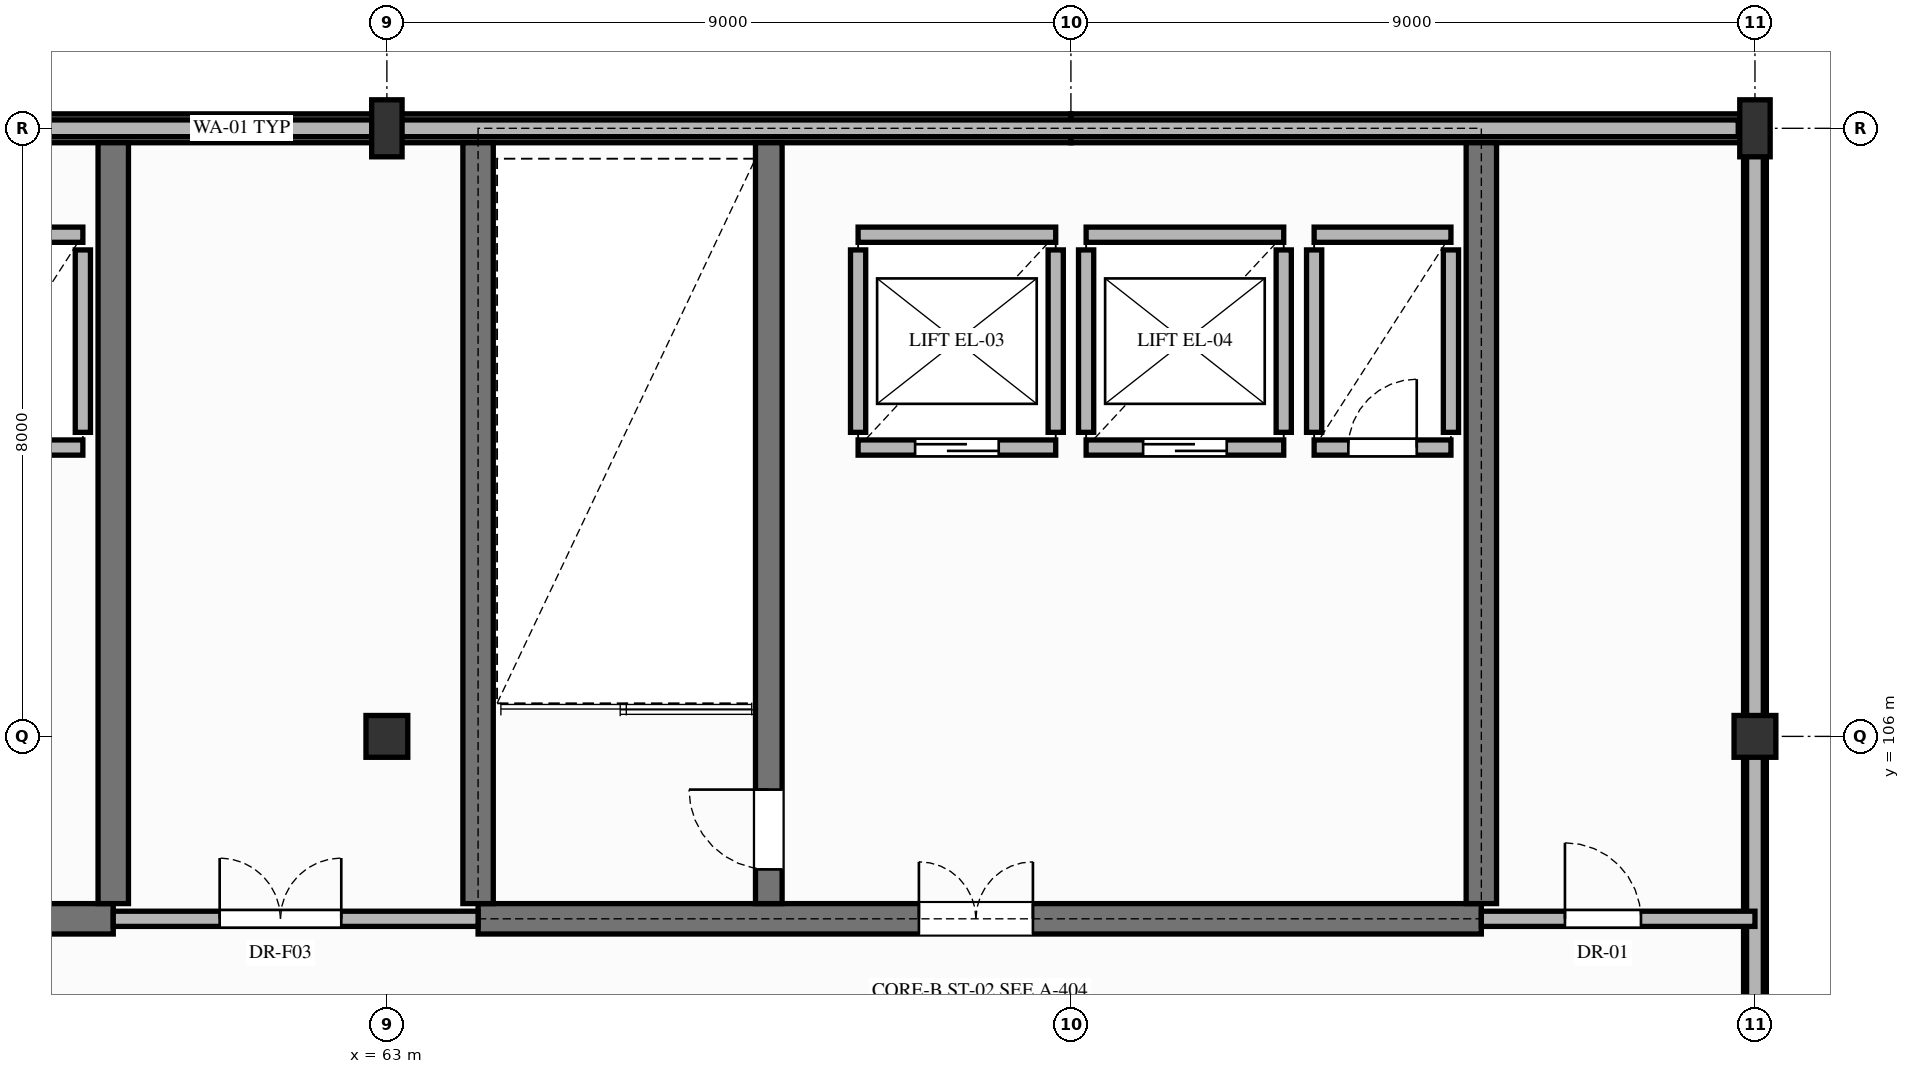
"""IFC4 building model, lengths in metres.
Left out: names, types, materials, properties, quantities, classifications, styles, units other than length and angle.
Written with IfcOpenShell. Run it as: python <this file> out.ifc"""

import sys

from ifc_helpers import new_model, si_unit, direction, frame, frame_2d, origin, origin_2d, place, context, subcontext, project, spatial, rectangle, extrude, element, fill, save


model = new_model("IFC4")
c1 = context("Model", 3, precision=1e-05, world=origin(), true_north=direction((0.0, 1.0)))
c2 = subcontext(c1, "Body", "Model", "MODEL_VIEW")
j1 = project(units=[si_unit("LENGTHUNIT", "METRE"), si_unit("PLANEANGLEUNIT", "RADIAN")], contexts=[c1])
p1 = place(None, origin())
s1 = spatial("IfcSite", under=j1, at=p1, CompositionType="ELEMENT")
p2 = place(p1, origin())
s2 = spatial("IfcBuilding", under=s1, at=p2, CompositionType="ELEMENT")
p3 = place(p2, frame((0.0, 0.0, 20.26)))
s3 = spatial("IfcBuildingStorey", under=s2, at=p3, CompositionType="ELEMENT", Elevation=20.26)
p4 = place(p3, frame((63.0, 106.0, 0.0), z_axis=(0.0, 0.0, 1.0), x_axis=(1.0, 0.0, 0.0)))
e1 = element("IfcColumn", 1, at=p4, inside=s3, PredefinedType="COLUMN", context=c2, shape_type="SweptSolid", body=[
    extrude(rectangle(XDim=0.55, YDim=0.55, at=origin_2d()), origin(), (0.0, 0.0, 1.0), 3.64),
])
p5 = place(p3, frame((63.0, 114.0, 0.0), z_axis=(0.0, 0.0, 1.0), x_axis=(0.0, 1.0, 0.0)))
e2 = element("IfcColumn", 2, at=p5, inside=s3, PredefinedType="COLUMN", context=c2, shape_type="SweptSolid", body=[
    extrude(rectangle(XDim=0.4, YDim=0.75, at=origin_2d()), origin(), (0.0, 0.0, 1.0), 3.64),
])
p6 = place(p3, frame((81.0, 106.0, 0.0), z_axis=(0.0, 0.0, 1.0), x_axis=(1.0, 0.0, 0.0)))
e3 = element("IfcColumn", 3, at=p6, inside=s3, PredefinedType="COLUMN", context=c2, shape_type="SweptSolid", body=[
    extrude(rectangle(XDim=0.55, YDim=0.55, at=origin_2d()), origin(), (0.0, 0.0, 1.0), 3.64),
])
p7 = place(p3, frame((81.0, 114.0, 0.0), z_axis=(0.0, 0.0, 1.0), x_axis=(0.0, 1.0, 0.0)))
e4 = element("IfcColumn", 4, at=p7, inside=s3, PredefinedType="COLUMN", context=c2, shape_type="SweptSolid", body=[
    extrude(rectangle(XDim=0.4, YDim=0.75, at=origin_2d()), origin(), (0.0, 0.0, 1.0), 3.64),
])
for number, where, z_axis, x_axis in (
    (5, (54.0, 114.0, 0.0), (0.0, 0.0, 1.0), (1.0, 0.0, 0.0)),
    (6, (63.0, 114.0, 0.0), (0.0, 0.0, 1.0), (1.0, 0.0, 0.0)),
    (7, (72.0, 114.0, 0.0), (0.0, 0.0, 1.0), (1.0, 0.0, 0.0)),
):
    element("IfcWall", number, at=place(p3, frame(where, z_axis=z_axis, x_axis=x_axis)), inside=s3, PredefinedType="SOLIDWALL", context=c2, shape_type="SweptSolid", body=[
        extrude(rectangle(XDim=9.0, YDim=0.38, at=frame_2d((4.5, 0.0))), origin(), (0.0, 0.0, 1.0), 3.39),
    ])
p8 = place(p3, frame((81.0, 90.0, 0.0), z_axis=(0.0, 0.0, 1.0), x_axis=(0.0, 1.0, 0.0)))
e8 = element("IfcWall", 8, at=p8, inside=s3, PredefinedType="SOLIDWALL", context=c2, shape_type="SweptSolid", body=[
    extrude(rectangle(XDim=24.0, YDim=0.3, at=frame_2d((12.0, 0.0))), origin(), (0.0, 0.0, 1.0), 2.585),
])
p9 = place(p8, frame((3.2, 0.0, 0.365)))
e9 = element("IfcOpeningElement", 9, at=p9, cuts=e8, PredefinedType="OPENING", context=c2, shape_type="SweptSolid", body=[
    extrude(rectangle(XDim=1.5, YDim=2.1, at=frame_2d((0.75, 1.05))), frame((0.0, 0.16, 0.0), z_axis=(0.0, -1.0, 0.0), x_axis=(1.0, 0.0, 0.0)), (0.0, 0.0, 1.0), 0.32),
])
p10 = place(p8, frame((10.5, 0.0, 0.615)))
e10 = element("IfcOpeningElement", 10, at=p10, cuts=e8, PredefinedType="OPENING", context=c2, shape_type="SweptSolid", body=[
    extrude(rectangle(XDim=1.35, YDim=1.85, at=frame_2d((0.675, 0.925))), frame((0.0, 0.16, 0.0), z_axis=(0.0, -1.0, 0.0), x_axis=(1.0, 0.0, 0.0)), (0.0, 0.0, 1.0), 0.32),
])
p11 = place(p3, frame((81.0, 90.22, 3.64), z_axis=(0.0, 0.0, 1.0), x_axis=(0.0, 1.0, 0.0)))
e11 = element("IfcWall", 11, at=p11, inside=s3, PredefinedType="PARAPET", context=c2, shape_type="SweptSolid", body=[
    extrude(rectangle(XDim=23.56, YDim=0.22, at=frame_2d((11.78, 0.0))), origin(), (0.0, 0.0, 1.0), 0.42),
])
p12 = place(p3, frame((80.78, 114.0, 3.64), z_axis=(0.0, 0.0, 1.0), x_axis=(-1.0, 0.0, 0.0)))
e12 = element("IfcWall", 12, at=p12, inside=s3, PredefinedType="PARAPET", context=c2, shape_type="SweptSolid", body=[
    extrude(rectangle(XDim=35.56, YDim=0.22, at=frame_2d((17.78, 0.0))), origin(), (0.0, 0.0, 1.0), 0.42),
])
p13 = place(p3, frame((46.2, 103.6, 0.0), z_axis=(0.0, 0.0, 1.0), x_axis=(1.0, 0.0, 0.0)))
e13 = element("IfcWall", 13, at=p13, inside=s3, PredefinedType="SHEAR", context=c2, shape_type="SweptSolid", body=[
    extrude(rectangle(XDim=13.2, YDim=0.4, at=frame_2d((6.6, 0.0))), origin(), (0.0, 0.0, 1.0), 3.39),
])
p14 = place(p13, frame((5.8, 0.0, 0.0)))
e14 = element("IfcOpeningElement", 14, at=p14, cuts=e13, PredefinedType="OPENING", context=c2, shape_type="SweptSolid", body=[
    extrude(rectangle(XDim=1.5, YDim=2.2, at=frame_2d((0.75, 1.1))), frame((0.0, 0.21, 0.0), z_axis=(0.0, -1.0, 0.0), x_axis=(1.0, 0.0, 0.0)), (0.0, 0.0, 1.0), 0.42),
])
p15 = place(p3, frame((59.4, 103.8, 0.0), z_axis=(0.0, 0.0, 1.0), x_axis=(0.0, 1.0, 0.0)))
e15 = element("IfcWall", 15, at=p15, inside=s3, PredefinedType="SHEAR", context=c2, shape_type="SweptSolid", body=[
    extrude(rectangle(XDim=10.01, YDim=0.4, at=frame_2d((5.005, 0.0))), origin(), (0.0, 0.0, 1.0), 3.39),
])
p16 = place(p3, frame((57.2, 109.8, 0.0), z_axis=(0.0, 0.0, 1.0), x_axis=(1.0, 0.0, 0.0)))
e16 = element("IfcWall", 16, at=p16, inside=s3, PredefinedType="PARTITIONING", context=c2, shape_type="SweptSolid", body=[
    extrude(rectangle(XDim=1.8, YDim=0.2, at=frame_2d((0.9, 0.0))), origin(), (0.0, 0.0, 1.0), 3.39),
])
p17 = place(p16, frame((0.45, 0.0, 0.0)))
e17 = element("IfcOpeningElement", 17, at=p17, cuts=e16, PredefinedType="OPENING", context=c2, shape_type="SweptSolid", body=[
    extrude(rectangle(XDim=0.9, YDim=2.1, at=frame_2d((0.45, 1.05))), frame((0.0, 0.11, 0.0), z_axis=(0.0, -1.0, 0.0), x_axis=(1.0, 0.0, 0.0)), (0.0, 0.0, 1.0), 0.22),
])
p18 = place(p3, frame((57.2, 112.6, 0.0), z_axis=(0.0, 0.0, 1.0), x_axis=(1.0, 0.0, 0.0)))
e18 = element("IfcWall", 18, at=p18, inside=s3, PredefinedType="PARTITIONING", context=c2, shape_type="SweptSolid", body=[
    extrude(rectangle(XDim=1.8, YDim=0.2, at=frame_2d((0.9, 0.0))), origin(), (0.0, 0.0, 1.0), 3.39),
])
p19 = place(p3, frame((59.0, 110.0, 0.0), z_axis=(0.0, 0.0, 1.0), x_axis=(0.0, 1.0, 0.0)))
e19 = element("IfcWall", 19, at=p19, inside=s3, PredefinedType="PARTITIONING", context=c2, shape_type="SweptSolid", body=[
    extrude(rectangle(XDim=2.4, YDim=0.2, at=frame_2d((1.2, 0.0))), origin(), (0.0, 0.0, 1.0), 3.39),
])
p20 = place(p3, frame((64.2, 103.6, 0.0), z_axis=(0.0, 0.0, 1.0), x_axis=(1.0, 0.0, 0.0)))
e20 = element("IfcWall", 20, at=p20, inside=s3, PredefinedType="SHEAR", context=c2, shape_type="SweptSolid", body=[
    extrude(rectangle(XDim=13.2, YDim=0.4, at=frame_2d((6.6, 0.0))), origin(), (0.0, 0.0, 1.0), 3.39),
])
p21 = place(p20, frame((5.8, 0.0, 0.0)))
e21 = element("IfcOpeningElement", 21, at=p21, cuts=e20, PredefinedType="OPENING", context=c2, shape_type="SweptSolid", body=[
    extrude(rectangle(XDim=1.5, YDim=2.2, at=frame_2d((0.75, 1.1))), frame((0.0, 0.21, 0.0), z_axis=(0.0, -1.0, 0.0), x_axis=(1.0, 0.0, 0.0)), (0.0, 0.0, 1.0), 0.42),
])
for number, where, z_axis, x_axis in (
    (22, (64.2, 103.8, 0.0), (0.0, 0.0, 1.0), (0.0, 1.0, 0.0)),
    (23, (77.4, 103.8, 0.0), (0.0, 0.0, 1.0), (0.0, 1.0, 0.0)),
):
    element("IfcWall", number, at=place(p3, frame(where, z_axis=z_axis, x_axis=x_axis)), inside=s3, PredefinedType="SHEAR", context=c2, shape_type="SweptSolid", body=[
        extrude(rectangle(XDim=10.01, YDim=0.4, at=frame_2d((5.005, 0.0))), origin(), (0.0, 0.0, 1.0), 3.39),
    ])
p22 = place(p3, frame((68.025, 103.8, 0.0), z_axis=(0.0, 0.0, 1.0), x_axis=(0.0, 1.0, 0.0)))
e24 = element("IfcWall", 24, at=p22, inside=s3, PredefinedType="SHEAR", context=c2, shape_type="SweptSolid", body=[
    extrude(rectangle(XDim=10.01, YDim=0.35, at=frame_2d((5.005, 0.0))), origin(), (0.0, 0.0, 1.0), 3.39),
])
p23 = place(p22, frame((0.45, 0.0, 0.0)))
e25 = element("IfcOpeningElement", 25, at=p23, cuts=e24, PredefinedType="OPENING", context=c2, shape_type="SweptSolid", body=[
    extrude(rectangle(XDim=1.05, YDim=2.2, at=frame_2d((0.525, 1.1))), frame((0.0, 0.185, 0.0), z_axis=(0.0, -1.0, 0.0), x_axis=(1.0, 0.0, 0.0)), (0.0, 0.0, 1.0), 0.37),
])
p24 = place(p3, frame((69.2, 109.8, 0.0), z_axis=(0.0, 0.0, 1.0), x_axis=(1.0, 0.0, 0.0)))
e26 = element("IfcWall", 26, at=p24, inside=s3, PredefinedType="PARTITIONING", context=c2, shape_type="SweptSolid", body=[
    extrude(rectangle(XDim=2.6, YDim=0.2, at=frame_2d((1.3, 0.0))), origin(), (0.0, 0.0, 1.0), 3.39),
])
p25 = place(p24, frame((0.75, 0.0, 0.0)))
e27 = element("IfcOpeningElement", 27, at=p25, cuts=e26, PredefinedType="OPENING", context=c2, shape_type="SweptSolid", body=[
    extrude(rectangle(XDim=1.1, YDim=2.15, at=frame_2d((0.55, 1.075))), frame((0.0, 0.11, 0.0), z_axis=(0.0, -1.0, 0.0), x_axis=(1.0, 0.0, 0.0)), (0.0, 0.0, 1.0), 0.22),
])
p26 = place(p3, frame((69.2, 112.6, 0.0), z_axis=(0.0, 0.0, 1.0), x_axis=(1.0, 0.0, 0.0)))
e28 = element("IfcWall", 28, at=p26, inside=s3, PredefinedType="PARTITIONING", context=c2, shape_type="SweptSolid", body=[
    extrude(rectangle(XDim=2.6, YDim=0.2, at=frame_2d((1.3, 0.0))), origin(), (0.0, 0.0, 1.0), 3.39),
])
for number, where, z_axis, x_axis in (
    (29, (69.2, 110.0, 0.0), (0.0, 0.0, 1.0), (0.0, 1.0, 0.0)),
    (30, (71.8, 110.0, 0.0), (0.0, 0.0, 1.0), (0.0, 1.0, 0.0)),
):
    element("IfcWall", number, at=place(p3, frame(where, z_axis=z_axis, x_axis=x_axis)), inside=s3, PredefinedType="PARTITIONING", context=c2, shape_type="SweptSolid", body=[
        extrude(rectangle(XDim=2.4, YDim=0.2, at=frame_2d((1.2, 0.0))), origin(), (0.0, 0.0, 1.0), 3.39),
    ])
p27 = place(p3, frame((72.2, 109.8, 0.0), z_axis=(0.0, 0.0, 1.0), x_axis=(1.0, 0.0, 0.0)))
e31 = element("IfcWall", 31, at=p27, inside=s3, PredefinedType="PARTITIONING", context=c2, shape_type="SweptSolid", body=[
    extrude(rectangle(XDim=2.6, YDim=0.2, at=frame_2d((1.3, 0.0))), origin(), (0.0, 0.0, 1.0), 3.39),
])
p28 = place(p27, frame((0.75, 0.0, 0.0)))
e32 = element("IfcOpeningElement", 32, at=p28, cuts=e31, PredefinedType="OPENING", context=c2, shape_type="SweptSolid", body=[
    extrude(rectangle(XDim=1.1, YDim=2.15, at=frame_2d((0.55, 1.075))), frame((0.0, 0.11, 0.0), z_axis=(0.0, -1.0, 0.0), x_axis=(1.0, 0.0, 0.0)), (0.0, 0.0, 1.0), 0.22),
])
p29 = place(p3, frame((72.2, 112.6, 0.0), z_axis=(0.0, 0.0, 1.0), x_axis=(1.0, 0.0, 0.0)))
e33 = element("IfcWall", 33, at=p29, inside=s3, PredefinedType="PARTITIONING", context=c2, shape_type="SweptSolid", body=[
    extrude(rectangle(XDim=2.6, YDim=0.2, at=frame_2d((1.3, 0.0))), origin(), (0.0, 0.0, 1.0), 3.39),
])
for number, where, z_axis, x_axis in (
    (34, (72.2, 110.0, 0.0), (0.0, 0.0, 1.0), (0.0, 1.0, 0.0)),
    (35, (74.8, 110.0, 0.0), (0.0, 0.0, 1.0), (0.0, 1.0, 0.0)),
):
    element("IfcWall", number, at=place(p3, frame(where, z_axis=z_axis, x_axis=x_axis)), inside=s3, PredefinedType="PARTITIONING", context=c2, shape_type="SweptSolid", body=[
        extrude(rectangle(XDim=2.4, YDim=0.2, at=frame_2d((1.2, 0.0))), origin(), (0.0, 0.0, 1.0), 3.39),
    ])
p30 = place(p3, frame((75.2, 109.8, 0.0), z_axis=(0.0, 0.0, 1.0), x_axis=(1.0, 0.0, 0.0)))
e36 = element("IfcWall", 36, at=p30, inside=s3, PredefinedType="PARTITIONING", context=c2, shape_type="SweptSolid", body=[
    extrude(rectangle(XDim=1.8, YDim=0.2, at=frame_2d((0.9, 0.0))), origin(), (0.0, 0.0, 1.0), 3.39),
])
p31 = place(p30, frame((0.45, 0.0, 0.0)))
e37 = element("IfcOpeningElement", 37, at=p31, cuts=e36, PredefinedType="OPENING", context=c2, shape_type="SweptSolid", body=[
    extrude(rectangle(XDim=0.9, YDim=2.1, at=frame_2d((0.45, 1.05))), frame((0.0, 0.11, 0.0), z_axis=(0.0, -1.0, 0.0), x_axis=(1.0, 0.0, 0.0)), (0.0, 0.0, 1.0), 0.22),
])
p32 = place(p3, frame((75.2, 112.6, 0.0), z_axis=(0.0, 0.0, 1.0), x_axis=(1.0, 0.0, 0.0)))
e38 = element("IfcWall", 38, at=p32, inside=s3, PredefinedType="PARTITIONING", context=c2, shape_type="SweptSolid", body=[
    extrude(rectangle(XDim=1.8, YDim=0.2, at=frame_2d((0.9, 0.0))), origin(), (0.0, 0.0, 1.0), 3.39),
])
for number, where, z_axis, x_axis in (
    (39, (75.2, 110.0, 0.0), (0.0, 0.0, 1.0), (0.0, 1.0, 0.0)),
    (40, (77.0, 110.0, 0.0), (0.0, 0.0, 1.0), (0.0, 1.0, 0.0)),
):
    element("IfcWall", number, at=place(p3, frame(where, z_axis=z_axis, x_axis=x_axis)), inside=s3, PredefinedType="PARTITIONING", context=c2, shape_type="SweptSolid", body=[
        extrude(rectangle(XDim=2.4, YDim=0.2, at=frame_2d((1.2, 0.0))), origin(), (0.0, 0.0, 1.0), 3.39),
    ])
p33 = place(p3, frame((59.4, 103.6, 0.0), z_axis=(0.0, 0.0, 1.0), x_axis=(1.0, 0.0, 0.0)))
e41 = element("IfcWall", 41, at=p33, inside=s3, PredefinedType="PARTITIONING", context=c2, shape_type="SweptSolid", body=[
    extrude(rectangle(XDim=4.8, YDim=0.2, at=frame_2d((2.4, 0.0))), origin(), (0.0, 0.0, 1.0), 3.39),
])
p34 = place(p33, frame((1.4, 0.0, 0.0)))
e42 = element("IfcOpeningElement", 42, at=p34, cuts=e41, PredefinedType="OPENING", context=c2, shape_type="SweptSolid", body=[
    extrude(rectangle(XDim=1.6, YDim=2.2, at=frame_2d((0.8, 1.1))), frame((0.0, 0.11, 0.0), z_axis=(0.0, -1.0, 0.0), x_axis=(1.0, 0.0, 0.0)), (0.0, 0.0, 1.0), 0.22),
])
p35 = place(p3, frame((77.4, 103.6, 0.0), z_axis=(0.0, 0.0, 1.0), x_axis=(1.0, 0.0, 0.0)))
e43 = element("IfcWall", 43, at=p35, inside=s3, PredefinedType="PARTITIONING", context=c2, shape_type="SweptSolid", body=[
    extrude(rectangle(XDim=3.6, YDim=0.2, at=frame_2d((1.8, 0.0))), origin(), (0.0, 0.0, 1.0), 3.39),
])
p36 = place(p35, frame((1.1, 0.0, 0.0)))
e44 = element("IfcOpeningElement", 44, at=p36, cuts=e43, PredefinedType="OPENING", context=c2, shape_type="SweptSolid", body=[
    extrude(rectangle(XDim=1.0, YDim=2.15, at=frame_2d((0.5, 1.075))), frame((0.0, 0.11, 0.0), z_axis=(0.0, -1.0, 0.0), x_axis=(1.0, 0.0, 0.0)), (0.0, 0.0, 1.0), 0.22),
])
p37 = place(p21, origin())
e45 = element("IfcDoor", 45, at=p37, inside=s3, OperationType="DOUBLE_DOOR_SINGLE_SWING", PredefinedType="DOOR", context=c2, shape_type="SweptSolid", body=[
    extrude(rectangle(XDim=1.5, YDim=2.2, at=frame_2d((0.75, 1.1))), frame((0.0, 0.025, 0.0), z_axis=(0.0, -1.0, 0.0), x_axis=(1.0, 0.0, 0.0)), (0.0, 0.0, 1.0), 0.05),
])
fill(e21, e45)
p38 = place(p23, origin())
e46 = element("IfcDoor", 46, at=p38, inside=s3, OperationType="SINGLE_SWING_RIGHT", PredefinedType="DOOR", context=c2, shape_type="SweptSolid", body=[
    extrude(rectangle(XDim=1.05, YDim=2.2, at=frame_2d((0.525, 1.1))), frame((0.0, 0.025, 0.0), z_axis=(0.0, -1.0, 0.0), x_axis=(1.0, 0.0, 0.0)), (0.0, 0.0, 1.0), 0.05),
])
fill(e25, e46)
p39 = place(p25, origin())
e47 = element("IfcDoor", 47, at=p39, inside=s3, OperationType="SLIDING_TO_LEFT", PredefinedType="DOOR", context=c2, shape_type="SweptSolid", body=[
    extrude(rectangle(XDim=1.1, YDim=2.15, at=frame_2d((0.55, 1.075))), frame((0.0, 0.025, 0.0), z_axis=(0.0, -1.0, 0.0), x_axis=(1.0, 0.0, 0.0)), (0.0, 0.0, 1.0), 0.05),
])
fill(e27, e47)
p40 = place(p28, origin())
e48 = element("IfcDoor", 48, at=p40, inside=s3, OperationType="SLIDING_TO_RIGHT", PredefinedType="DOOR", context=c2, shape_type="SweptSolid", body=[
    extrude(rectangle(XDim=1.1, YDim=2.15, at=frame_2d((0.55, 1.075))), frame((0.0, 0.025, 0.0), z_axis=(0.0, -1.0, 0.0), x_axis=(1.0, 0.0, 0.0)), (0.0, 0.0, 1.0), 0.05),
])
fill(e32, e48)
p41 = place(p31, origin())
e49 = element("IfcDoor", 49, at=p41, inside=s3, OperationType="SINGLE_SWING_RIGHT", PredefinedType="DOOR", context=c2, shape_type="SweptSolid", body=[
    extrude(rectangle(XDim=0.9, YDim=2.1, at=frame_2d((0.45, 1.05))), frame((0.0, 0.025, 0.0), z_axis=(0.0, -1.0, 0.0), x_axis=(1.0, 0.0, 0.0)), (0.0, 0.0, 1.0), 0.05),
])
fill(e37, e49)
p42 = place(p34, origin())
e50 = element("IfcDoor", 50, at=p42, inside=s3, OperationType="DOUBLE_DOOR_SINGLE_SWING", PredefinedType="DOOR", context=c2, shape_type="SweptSolid", body=[
    extrude(rectangle(XDim=1.6, YDim=2.2, at=frame_2d((0.8, 1.1))), frame((0.0, 0.025, 0.0), z_axis=(0.0, -1.0, 0.0), x_axis=(1.0, 0.0, 0.0)), (0.0, 0.0, 1.0), 0.05),
])
fill(e42, e50)
p43 = place(p36, origin())
e51 = element("IfcDoor", 51, at=p43, inside=s3, OperationType="SINGLE_SWING_LEFT", PredefinedType="DOOR", context=c2, shape_type="SweptSolid", body=[
    extrude(rectangle(XDim=1.0, YDim=2.15, at=frame_2d((0.5, 1.075))), frame((0.0, 0.025, 0.0), z_axis=(0.0, -1.0, 0.0), x_axis=(1.0, 0.0, 0.0)), (0.0, 0.0, 1.0), 0.05),
])
fill(e44, e51)
save(model, sys.argv[1])
